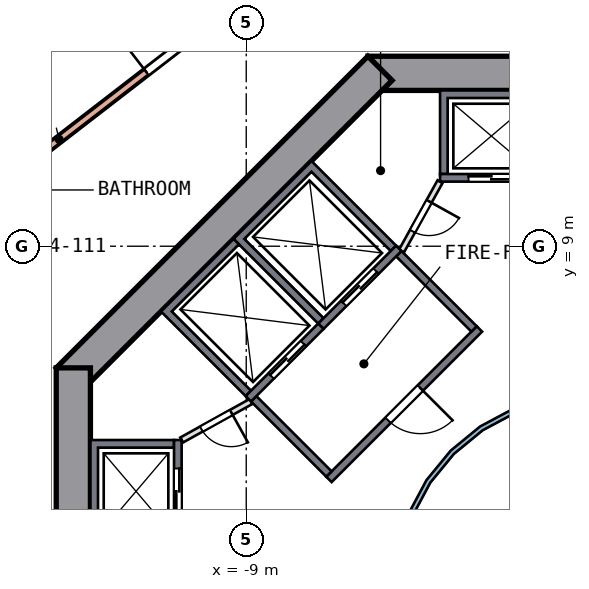
"""IFC4 building model, lengths in metres.
Left out: names, types, materials, properties, quantities, classifications, styles, units other than length and angle.
Written with IfcOpenShell. Run it as: python <this file> out.ifc"""

import sys

from ifc_helpers import new_model, si_unit, direction, frame, frame_2d, origin, place, context, subcontext, project, spatial, polyline, rectangle, outline, extrude, element, fill, save


model = new_model("IFC4")
c1 = context("Model", 3, precision=1e-05, world=origin(), true_north=direction((0.0, 1.0)))
c2 = subcontext(c1, "Body", "Model", "MODEL_VIEW")
j1 = project(units=[si_unit("LENGTHUNIT", "METRE"), si_unit("PLANEANGLEUNIT", "RADIAN")], contexts=[c1])
p1 = place(None, origin())
s1 = spatial("IfcSite", under=j1, at=p1, CompositionType="ELEMENT")
p2 = place(p1, origin())
s2 = spatial("IfcBuilding", under=s1, at=p2, CompositionType="ELEMENT")
p3 = place(p2, frame((0.0, 0.0, 64.5)))
s3 = spatial("IfcBuildingStorey", under=s2, at=p3, CompositionType="ELEMENT", Elevation=64.5)
p4 = place(p3, frame((5.799, 13.55, 0.0), z_axis=(0.0, 0.0, 1.0), x_axis=(-1.0, 0.0, 0.0)))
e1 = element("IfcWall", 1, at=p4, inside=s3, PredefinedType="SHEAR", context=c2, shape_type="SweptSolid", body=[
    extrude(rectangle(XDim=11.598, YDim=0.9, at=frame_2d((5.799, 0.0))), origin(), (0.0, 0.0, 1.0), 3.5),
])
p5 = place(p4, frame((4.899, 0.0, 0.0)))
e2 = element("IfcOpeningElement", 2, at=p5, cuts=e1, PredefinedType="OPENING", context=c2, shape_type="SweptSolid", body=[
    extrude(rectangle(XDim=1.8, YDim=2.1, at=frame_2d((0.9, 1.05))), frame((0.0, 0.46, 0.0), z_axis=(0.0, -1.0, 0.0), x_axis=(1.0, 0.0, 0.0)), (0.0, 0.0, 1.0), 0.92),
])
p6 = place(p3, frame((-5.481, 13.682, 0.0), z_axis=(0.0, 0.0, 1.0), x_axis=(-0.707106781, -0.707106781, 0.0)))
e3 = element("IfcWall", 3, at=p6, inside=s3, PredefinedType="SHEAR", context=c2, shape_type="SweptSolid", body=[
    extrude(rectangle(XDim=11.598, YDim=0.9, at=frame_2d((5.799, 0.0))), origin(), (0.0, 0.0, 1.0), 3.5),
])
p7 = place(p3, frame((-13.55, 5.799, 0.0), z_axis=(0.0, 0.0, 1.0), x_axis=(0.0, -1.0, 0.0)))
e4 = element("IfcWall", 4, at=p7, inside=s3, PredefinedType="SHEAR", context=c2, shape_type="SweptSolid", body=[
    extrude(rectangle(XDim=11.598, YDim=0.9, at=frame_2d((5.799, 0.0))), origin(), (0.0, 0.0, 1.0), 3.5),
])
p8 = place(p7, frame((4.899, 0.0, 0.0)))
e5 = element("IfcOpeningElement", 5, at=p8, cuts=e4, PredefinedType="OPENING", context=c2, shape_type="SweptSolid", body=[
    extrude(rectangle(XDim=1.8, YDim=2.1, at=frame_2d((0.9, 1.05))), frame((0.0, 0.46, 0.0), z_axis=(0.0, -1.0, 0.0), x_axis=(1.0, 0.0, 0.0)), (0.0, 0.0, 1.0), 0.92),
])
p9 = place(p3, frame((-16.06, 10.161, 0.0), z_axis=(0.0, 0.0, 1.0), x_axis=(0.791439855, 0.61124705, 0.0)))
e6 = element("IfcWall", 6, at=p9, inside=s3, PredefinedType="SOLIDWALL", context=c2, shape_type="SweptSolid", body=[
    extrude(rectangle(XDim=13.0, YDim=0.2, at=frame_2d((6.5, 0.0))), origin(), (0.0, 0.0, 1.0), 3.19),
])
p10 = place(p9, frame((5.6, 0.0, 0.0)))
e7 = element("IfcOpeningElement", 7, at=p10, cuts=e6, PredefinedType="OPENING", context=c2, shape_type="SweptSolid", body=[
    extrude(rectangle(XDim=1.8, YDim=2.4, at=frame_2d((0.9, 1.2))), frame((0.0, 0.11, 0.0), z_axis=(0.0, -1.0, 0.0), x_axis=(1.0, 0.0, 0.0)), (0.0, 0.0, 1.0), 0.22),
])
p11 = place(p3, origin())
e8 = element("IfcWall", 8, at=p11, inside=s3, PredefinedType="SOLIDWALL", context=c2, shape_type="SweptSolid", body=[
    extrude(outline(polyline([(-3.9, 10.9), (-3.9, 13.1), (-1.2, 13.1), (-1.2, 10.9), (-1.4, 10.9), (-1.4, 12.9), (-3.7, 12.9), (-3.7, 10.9), (-3.9, 10.9)])), origin(), (0.0, 0.0, 1.0), 3.19),
])
p12 = place(p3, frame((-1.2, 10.8, 0.0), z_axis=(0.0, 0.0, 1.0), x_axis=(-1.0, 0.0, 0.0)))
e9 = element("IfcWall", 9, at=p12, inside=s3, PredefinedType="SOLIDWALL", context=c2, shape_type="SweptSolid", body=[
    extrude(rectangle(XDim=2.7, YDim=0.2, at=frame_2d((1.35, 0.0))), origin(), (0.0, 0.0, 1.0), 3.19),
])
p13 = place(p12, frame((0.75, 0.0, 0.0)))
e10 = element("IfcOpeningElement", 10, at=p13, cuts=e9, PredefinedType="OPENING", context=c2, shape_type="SweptSolid", body=[
    extrude(rectangle(XDim=1.2, YDim=2.1, at=frame_2d((0.6, 1.05))), frame((0.0, 0.11, 0.0), z_axis=(0.0, -1.0, 0.0), x_axis=(1.0, 0.0, 0.0)), (0.0, 0.0, 1.0), 0.22),
])
p14 = place(p3, origin())
e11 = element("IfcWall", 11, at=p14, inside=s3, PredefinedType="SOLIDWALL", context=c2, shape_type="SweptSolid", body=[
    extrude(outline(polyline([(-13.1, 3.9), (-10.9, 3.9), (-10.9, 3.7), (-12.9, 3.7), (-12.9, 1.4), (-10.9, 1.4), (-10.9, 1.2), (-13.1, 1.2), (-13.1, 3.9)])), origin(), (0.0, 0.0, 1.0), 3.19),
])
p15 = place(p3, frame((-10.8, 1.2, 0.0), z_axis=(0.0, 0.0, 1.0), x_axis=(0.0, 1.0, 0.0)))
e12 = element("IfcWall", 12, at=p15, inside=s3, PredefinedType="SOLIDWALL", context=c2, shape_type="SweptSolid", body=[
    extrude(rectangle(XDim=2.7, YDim=0.2, at=frame_2d((1.35, 0.0))), origin(), (0.0, 0.0, 1.0), 3.19),
])
p16 = place(p15, frame((0.75, 0.0, 0.0)))
e13 = element("IfcOpeningElement", 13, at=p16, cuts=e12, PredefinedType="OPENING", context=c2, shape_type="SweptSolid", body=[
    extrude(rectangle(XDim=1.2, YDim=2.1, at=frame_2d((0.6, 1.05))), frame((0.0, 0.11, 0.0), z_axis=(0.0, -1.0, 0.0), x_axis=(1.0, 0.0, 0.0)), (0.0, 0.0, 1.0), 0.22),
])
p17 = place(p3, origin())
e14 = element("IfcWall", 14, at=p17, inside=s3, PredefinedType="SOLIDWALL", context=c2, shape_type="SweptSolid", body=[
    extrude(outline(polyline([(-9.334, 9.192), (-7.283, 11.243), (-5.056, 9.016), (-5.197, 8.874), (-7.283, 10.96), (-9.051, 9.192), (-6.965, 7.106), (-7.106, 6.965), (-9.334, 9.192)])), origin(), (0.0, 0.0, 1.0), 3.19),
])
p18 = place(p3, frame((-4.985, 8.945, 0.0), z_axis=(0.0, 0.0, 1.0), x_axis=(-0.707106781, -0.707106781, 0.0)))
e15 = element("IfcWall", 15, at=p18, inside=s3, PredefinedType="SOLIDWALL", context=c2, shape_type="SweptSolid", body=[
    extrude(rectangle(XDim=2.9, YDim=0.2, at=frame_2d((1.45, 0.0))), origin(), (0.0, 0.0, 1.0), 3.19),
])
p19 = place(p18, frame((0.85, 0.0, 0.0)))
e16 = element("IfcOpeningElement", 16, at=p19, cuts=e15, PredefinedType="OPENING", context=c2, shape_type="SweptSolid", body=[
    extrude(rectangle(XDim=1.2, YDim=2.1, at=frame_2d((0.6, 1.05))), frame((0.0, 0.11, 0.0), z_axis=(0.0, -1.0, 0.0), x_axis=(1.0, 0.0, 0.0)), (0.0, 0.0, 1.0), 0.22),
])
p20 = place(p3, origin())
e17 = element("IfcWall", 17, at=p20, inside=s3, PredefinedType="SOLIDWALL", context=c2, shape_type="SweptSolid", body=[
    extrude(outline(polyline([(-11.243, 7.283), (-9.334, 9.192), (-9.192, 9.051), (-10.96, 7.283), (-8.874, 5.197), (-9.016, 5.056), (-11.243, 7.283)])), origin(), (0.0, 0.0, 1.0), 3.19),
])
p21 = place(p3, frame((-7.036, 6.894, 0.0), z_axis=(0.0, 0.0, 1.0), x_axis=(-0.707106781, -0.707106781, 0.0)))
e18 = element("IfcWall", 18, at=p21, inside=s3, PredefinedType="SOLIDWALL", context=c2, shape_type="SweptSolid", body=[
    extrude(rectangle(XDim=2.7, YDim=0.2, at=frame_2d((1.35, 0.0))), origin(), (0.0, 0.0, 1.0), 3.19),
])
p22 = place(p21, frame((0.65, 0.0, 0.0)))
e19 = element("IfcOpeningElement", 19, at=p22, cuts=e18, PredefinedType="OPENING", context=c2, shape_type="SweptSolid", body=[
    extrude(rectangle(XDim=1.2, YDim=2.1, at=frame_2d((0.6, 1.05))), frame((0.0, 0.11, 0.0), z_axis=(0.0, -1.0, 0.0), x_axis=(1.0, 0.0, 0.0)), (0.0, 0.0, 1.0), 0.22),
])
p23 = place(p3, frame((-2.864, 6.823, 0.0), z_axis=(0.0, 0.0, 1.0), x_axis=(-0.707106781, -0.707106781, 0.0)))
e20 = element("IfcWall", 20, at=p23, inside=s3, PredefinedType="SOLIDWALL", context=c2, shape_type="SweptSolid", body=[
    extrude(rectangle(XDim=5.6, YDim=0.2, at=frame_2d((2.8, 0.0))), origin(), (0.0, 0.0, 1.0), 3.19),
])
p24 = place(p23, frame((2.2, 0.0, 0.0)))
e21 = element("IfcOpeningElement", 21, at=p24, cuts=e20, PredefinedType="OPENING", context=c2, shape_type="SweptSolid", body=[
    extrude(rectangle(XDim=1.2, YDim=2.1, at=frame_2d((0.6, 1.05))), frame((0.0, 0.11, 0.0), z_axis=(0.0, -1.0, 0.0), x_axis=(1.0, 0.0, 0.0)), (0.0, 0.0, 1.0), 0.22),
])
for number, where, z_axis, x_axis in (
    (22, (-3.005, 6.823, 0.0), (0.0, 0.0, 1.0), (-0.707, 0.707, 0.0)),
    (23, (-6.823, 3.005, 0.0), (0.0, 0.0, 1.0), (-0.707, 0.707, 0.0)),
):
    element("IfcWall", number, at=place(p3, frame(where, z_axis=z_axis, x_axis=x_axis)), inside=s3, PredefinedType="SOLIDWALL", context=c2, shape_type="SweptSolid", body=[
        extrude(rectangle(XDim=2.8, YDim=0.2, at=frame_2d((1.4, 0.0))), origin(), (0.0, 0.0, 1.0), 3.19),
    ])
p25 = place(p3, frame((-3.9, 10.7, 0.0), z_axis=(0.0, 0.0, 1.0), x_axis=(-0.485692555, -0.874129705, 0.0)))
e24 = element("IfcWall", 24, at=p25, inside=s3, PredefinedType="PARTITIONING", context=c2, shape_type="SweptSolid", body=[
    extrude(rectangle(XDim=2.089, YDim=0.15, at=frame_2d((1.044, 0.0))), origin(), (0.0, 0.0, 1.0), 3.19),
])
p26 = place(p25, frame((0.594, 0.0, 0.0)))
e25 = element("IfcOpeningElement", 25, at=p26, cuts=e24, PredefinedType="OPENING", context=c2, shape_type="SweptSolid", body=[
    extrude(rectangle(XDim=0.9, YDim=2.1, at=frame_2d((0.45, 1.05))), frame((0.0, 0.085, 0.0), z_axis=(0.0, -1.0, 0.0), x_axis=(1.0, 0.0, 0.0)), (0.0, 0.0, 1.0), 0.17),
])
p27 = place(p3, frame((-8.874, 4.914, 0.0), z_axis=(0.0, 0.0, 1.0), x_axis=(-0.874129705, -0.485692555, 0.0)))
e26 = element("IfcWall", 26, at=p27, inside=s3, PredefinedType="PARTITIONING", context=c2, shape_type="SweptSolid", body=[
    extrude(rectangle(XDim=2.089, YDim=0.15, at=frame_2d((1.044, 0.0))), origin(), (0.0, 0.0, 1.0), 3.19),
])
p28 = place(p27, frame((0.594, 0.0, 0.0)))
e27 = element("IfcOpeningElement", 27, at=p28, cuts=e26, PredefinedType="OPENING", context=c2, shape_type="SweptSolid", body=[
    extrude(rectangle(XDim=0.9, YDim=2.1, at=frame_2d((0.45, 1.05))), frame((0.0, 0.085, 0.0), z_axis=(0.0, -1.0, 0.0), x_axis=(1.0, 0.0, 0.0)), (0.0, 0.0, 1.0), 0.17),
])
p29 = place(p3, origin())
e28 = element("IfcWall", 28, at=p29, inside=s3, PredefinedType="SOLIDWALL", context=c2, shape_type="SweptSolid", body=[
    extrude(outline(polyline([(5.021, -0.999), (4.73, -1.959), (4.257, -2.844), (3.62, -3.62), (2.844, -4.257), (1.959, -4.73), (0.999, -5.021), (0.0, -5.12), (-0.999, -5.021), (-1.959, -4.73), (-2.844, -4.257), (-3.62, -3.62), (-4.257, -2.844), (-4.73, -1.959), (-5.021, -0.999), (-5.12, 0.0), (-5.021, 0.999), (-4.73, 1.959), (-4.257, 2.844), (-3.62, 3.62), (-2.844, 4.257), (-1.959, 4.73), (-0.999, 5.021), (0.0, 5.12), (0.999, 5.021), (1.959, 4.73), (2.844, 4.257), (3.62, 3.62), (4.257, 2.844), (4.73, 1.959), (5.021, 0.999), (5.12, 0.0), (5.021, -0.999)]), holes=[polyline([(4.904, 0.976), (4.619, 1.913), (4.157, 2.778), (3.535, 3.535), (2.778, 4.157), (1.913, 4.619), (0.976, 4.904), (0.0, 5.0), (-0.976, 4.904), (-1.913, 4.619), (-2.778, 4.157), (-3.535, 3.535), (-4.157, 2.778), (-4.619, 1.913), (-4.904, 0.976), (-5.0, 0.0), (-4.904, -0.976), (-4.619, -1.913), (-4.157, -2.778), (-3.535, -3.535), (-2.778, -4.157), (-1.913, -4.619), (-0.976, -4.904), (0.0, -5.0), (0.976, -4.904), (1.913, -4.619), (2.778, -4.157), (3.535, -3.535), (4.157, -2.778), (4.619, -1.913), (4.904, -0.976), (5.0, 0.0), (4.904, 0.976)])]), origin(), (0.0, 0.0, 1.0), 3.19),
])
p30 = place(p10, origin())
e29 = element("IfcDoor", 29, at=p30, inside=s3, OperationType="DOUBLE_DOOR_SINGLE_SWING", PredefinedType="DOOR", context=c2, shape_type="SweptSolid", body=[
    extrude(rectangle(XDim=1.8, YDim=2.4, at=frame_2d((0.9, 1.2))), frame((0.0, 0.025, 0.0), z_axis=(0.0, -1.0, 0.0), x_axis=(1.0, 0.0, 0.0)), (0.0, 0.0, 1.0), 0.05),
])
fill(e7, e29)
p31 = place(p13, origin())
e30 = element("IfcDoor", 30, at=p31, inside=s3, OperationType="DOUBLE_DOOR_SLIDING", PredefinedType="DOOR", context=c2, shape_type="SweptSolid", body=[
    extrude(rectangle(XDim=1.2, YDim=2.1, at=frame_2d((0.6, 1.05))), frame((0.0, 0.025, 0.0), z_axis=(0.0, -1.0, 0.0), x_axis=(1.0, 0.0, 0.0)), (0.0, 0.0, 1.0), 0.05),
])
fill(e10, e30)
p32 = place(p16, origin())
e31 = element("IfcDoor", 31, at=p32, inside=s3, OperationType="DOUBLE_DOOR_SLIDING", PredefinedType="DOOR", context=c2, shape_type="SweptSolid", body=[
    extrude(rectangle(XDim=1.2, YDim=2.1, at=frame_2d((0.6, 1.05))), frame((0.0, 0.025, 0.0), z_axis=(0.0, -1.0, 0.0), x_axis=(1.0, 0.0, 0.0)), (0.0, 0.0, 1.0), 0.05),
])
fill(e13, e31)
p33 = place(p19, origin())
e32 = element("IfcDoor", 32, at=p33, inside=s3, OperationType="DOUBLE_DOOR_SLIDING", PredefinedType="DOOR", context=c2, shape_type="SweptSolid", body=[
    extrude(rectangle(XDim=1.2, YDim=2.1, at=frame_2d((0.6, 1.05))), frame((0.0, 0.025, 0.0), z_axis=(0.0, -1.0, 0.0), x_axis=(1.0, 0.0, 0.0)), (0.0, 0.0, 1.0), 0.05),
])
fill(e16, e32)
p34 = place(p22, origin())
e33 = element("IfcDoor", 33, at=p34, inside=s3, OperationType="DOUBLE_DOOR_SLIDING", PredefinedType="DOOR", context=c2, shape_type="SweptSolid", body=[
    extrude(rectangle(XDim=1.2, YDim=2.1, at=frame_2d((0.6, 1.05))), frame((0.0, 0.025, 0.0), z_axis=(0.0, -1.0, 0.0), x_axis=(1.0, 0.0, 0.0)), (0.0, 0.0, 1.0), 0.05),
])
fill(e19, e33)
p35 = place(p24, origin())
e34 = element("IfcDoor", 34, at=p35, inside=s3, OperationType="SINGLE_SWING_LEFT", PredefinedType="DOOR", context=c2, shape_type="SweptSolid", body=[
    extrude(rectangle(XDim=1.2, YDim=2.1, at=frame_2d((0.6, 1.05))), frame((0.0, 0.025, 0.0), z_axis=(0.0, -1.0, 0.0), x_axis=(1.0, 0.0, 0.0)), (0.0, 0.0, 1.0), 0.05),
])
fill(e21, e34)
p36 = place(p26, origin())
e35 = element("IfcDoor", 35, at=p36, inside=s3, OperationType="SINGLE_SWING_LEFT", PredefinedType="DOOR", context=c2, shape_type="SweptSolid", body=[
    extrude(rectangle(XDim=0.9, YDim=2.1, at=frame_2d((0.45, 1.05))), frame((0.0, 0.025, 0.0), z_axis=(0.0, -1.0, 0.0), x_axis=(1.0, 0.0, 0.0)), (0.0, 0.0, 1.0), 0.05),
])
fill(e25, e35)
p37 = place(p28, origin())
e36 = element("IfcDoor", 36, at=p37, inside=s3, OperationType="SINGLE_SWING_LEFT", PredefinedType="DOOR", context=c2, shape_type="SweptSolid", body=[
    extrude(rectangle(XDim=0.9, YDim=2.1, at=frame_2d((0.45, 1.05))), frame((0.0, 0.025, 0.0), z_axis=(0.0, -1.0, 0.0), x_axis=(1.0, 0.0, 0.0)), (0.0, 0.0, 1.0), 0.05),
])
fill(e27, e36)
save(model, sys.argv[1])
